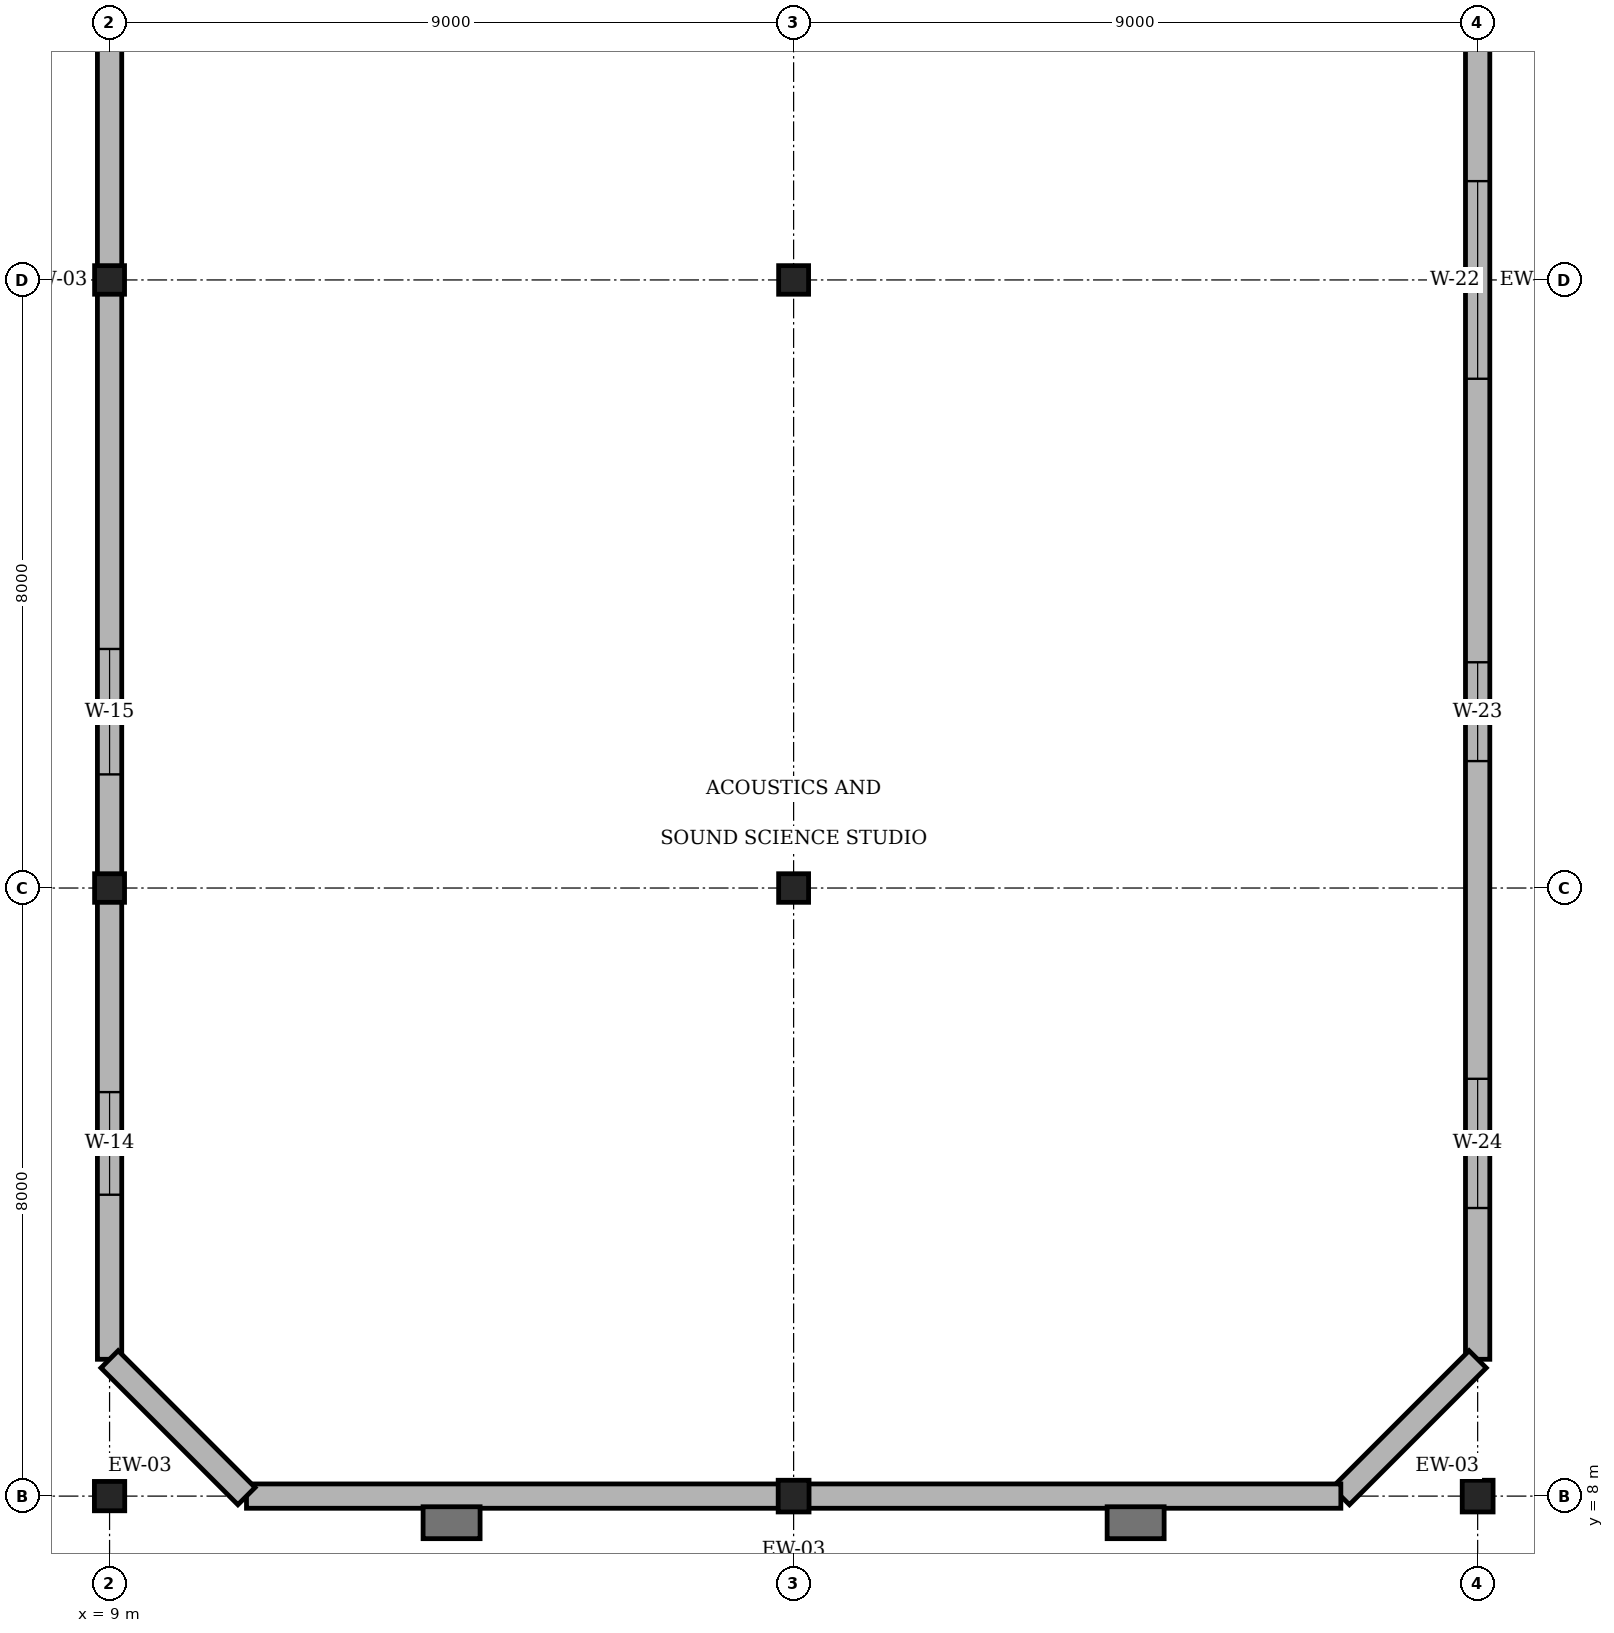
"""IFC4 building model, lengths in metres.
Left out: names, types, materials, properties, quantities, classifications, styles, units other than length and angle.
Written with IfcOpenShell. Run it as: python <this file> out.ifc"""

import sys

from ifc_helpers import new_model, si_unit, direction, frame, frame_2d, origin, origin_2d, place, context, subcontext, project, spatial, rectangle, i_section, extrude, element, fill, save


model = new_model("IFC4")
c1 = context("Model", 3, precision=1e-05, world=origin(), true_north=direction((0.0, 1.0)))
c2 = subcontext(c1, "Body", "Model", "MODEL_VIEW")
j1 = project(units=[si_unit("LENGTHUNIT", "METRE"), si_unit("PLANEANGLEUNIT", "RADIAN")], contexts=[c1])
p1 = place(None, origin())
s1 = spatial("IfcSite", under=j1, at=p1, CompositionType="ELEMENT")
p2 = place(p1, origin())
s2 = spatial("IfcBuilding", under=s1, at=p2, CompositionType="ELEMENT")
p3 = place(p2, frame((0.0, 0.0, 10.8)))
s3 = spatial("IfcBuildingStorey", under=s2, at=p3, CompositionType="ELEMENT", Elevation=10.8)
p4 = place(p3, frame((9.0, 8.0, 0.0), z_axis=(0.0, 0.0, 1.0), x_axis=(1.0, 0.0, 0.0)))
e1 = element("IfcColumn", 1, at=p4, inside=s3, PredefinedType="COLUMN", context=c2, shape_type="SweptSolid", body=[
    extrude(i_section(OverallWidth=0.399, OverallDepth=0.386, WebThickness=0.021, FlangeThickness=0.033, FilletRadius=0.015, at=origin_2d()), origin(), (0.0, 0.0, 1.0), 5.05),
])
for number, where, z_axis, x_axis in (
    (2, (18.0, 8.0, 0.0), (0.0, 0.0, 1.0), (1.0, 0.0, 0.0)),
    (3, (27.0, 8.0, 0.0), (0.0, 0.0, 1.0), (1.0, 0.0, 0.0)),
):
    element("IfcColumn", number, at=place(p3, frame(where, z_axis=z_axis, x_axis=x_axis)), inside=s3, PredefinedType="COLUMN", context=c2, shape_type="SweptSolid", body=[
        extrude(i_section(OverallWidth=0.406, OverallDepth=0.417, WebThickness=0.03, FlangeThickness=0.044, FilletRadius=0.015, at=origin_2d()), origin(), (0.0, 0.0, 1.0), 5.05),
    ])
for number, where, z_axis, x_axis in (
    (4, (9.0, 16.0, 0.0), (0.0, 0.0, 1.0), (1.0, 0.0, 0.0)),
    (5, (9.0, 24.0, 0.0), (0.0, 0.0, 1.0), (1.0, 0.0, 0.0)),
    (6, (18.0, 16.0, 0.0), (0.0, 0.0, 1.0), (1.0, 0.0, 0.0)),
    (7, (18.0, 24.0, 0.0), (0.0, 0.0, 1.0), (1.0, 0.0, 0.0)),
):
    element("IfcColumn", number, at=place(p3, frame(where, z_axis=z_axis, x_axis=x_axis)), inside=s3, PredefinedType="COLUMN", context=c2, shape_type="SweptSolid", body=[
        extrude(i_section(OverallWidth=0.394, OverallDepth=0.376, WebThickness=0.017, FlangeThickness=0.028, FilletRadius=0.015, at=origin_2d()), origin(), (0.0, 0.0, 1.0), 5.05),
    ])
for number, where, z_axis, x_axis in (
    (8, (13.5, 7.65, 0.0), (0.0, 0.0, 1.0), (1.0, 0.0, 0.0)),
    (9, (22.5, 7.65, 0.0), (0.0, 0.0, 1.0), (1.0, 0.0, 0.0)),
):
    element("IfcColumn", number, at=place(p3, frame(where, z_axis=z_axis, x_axis=x_axis)), inside=s3, PredefinedType="PILASTER", context=c2, shape_type="SweptSolid", body=[
        extrude(rectangle(XDim=0.75, YDim=0.42, at=origin_2d()), origin(), (0.0, 0.0, 1.0), 4.8),
    ])
p5 = place(p3, frame((9.0, 9.8, 0.0), z_axis=(0.0, 0.0, 1.0), x_axis=(0.0, 1.0, 0.0)))
e10 = element("IfcWall", 10, at=p5, inside=s3, PredefinedType="SOLIDWALL", context=c2, shape_type="SweptSolid", body=[
    extrude(rectangle(XDim=28.4, YDim=0.32, at=frame_2d((14.2, 0.0))), origin(), (0.0, 0.0, 1.0), 4.12),
])
p6 = place(p5, frame((2.165, 0.0, 1.0)))
e11 = element("IfcOpeningElement", 11, at=p6, cuts=e10, PredefinedType="OPENING", context=c2, shape_type="SweptSolid", body=[
    extrude(rectangle(XDim=1.35, YDim=1.6, at=frame_2d((0.675, 0.8))), frame((0.0, 0.17, 0.0), z_axis=(0.0, -1.0, 0.0), x_axis=(1.0, 0.0, 0.0)), (0.0, 0.0, 1.0), 0.34),
])
p7 = place(p5, frame((7.695, 0.0, 1.0)))
e12 = element("IfcOpeningElement", 12, at=p7, cuts=e10, PredefinedType="OPENING", context=c2, shape_type="SweptSolid", body=[
    extrude(rectangle(XDim=1.65, YDim=1.6, at=frame_2d((0.825, 0.8))), frame((0.0, 0.17, 0.0), z_axis=(0.0, -1.0, 0.0), x_axis=(1.0, 0.0, 0.0)), (0.0, 0.0, 1.0), 0.34),
])
p8 = place(p5, frame((18.905, 0.0, 1.0)))
e13 = element("IfcOpeningElement", 13, at=p8, cuts=e10, PredefinedType="OPENING", context=c2, shape_type="SweptSolid", body=[
    extrude(rectangle(XDim=1.95, YDim=1.6, at=frame_2d((0.975, 0.8))), frame((0.0, 0.17, 0.0), z_axis=(0.0, -1.0, 0.0), x_axis=(1.0, 0.0, 0.0)), (0.0, 0.0, 1.0), 0.34),
])
p9 = place(p5, frame((24.435, 0.0, 1.0)))
e14 = element("IfcOpeningElement", 14, at=p9, cuts=e10, PredefinedType="OPENING", context=c2, shape_type="SweptSolid", body=[
    extrude(rectangle(XDim=2.25, YDim=1.6, at=frame_2d((1.125, 0.8))), frame((0.0, 0.17, 0.0), z_axis=(0.0, -1.0, 0.0), x_axis=(1.0, 0.0, 0.0)), (0.0, 0.0, 1.0), 0.34),
])
p10 = place(p3, frame((27.0, 38.2, 0.0), z_axis=(0.0, 0.0, 1.0), x_axis=(0.0, -1.0, 0.0)))
e15 = element("IfcWall", 15, at=p10, inside=s3, PredefinedType="SOLIDWALL", context=c2, shape_type="SweptSolid", body=[
    extrude(rectangle(XDim=28.4, YDim=0.32, at=frame_2d((14.2, 0.0))), origin(), (0.0, 0.0, 1.0), 4.12),
])
p11 = place(p10, frame((1.965, 0.0, 1.0)))
e16 = element("IfcOpeningElement", 16, at=p11, cuts=e15, PredefinedType="OPENING", context=c2, shape_type="SweptSolid", body=[
    extrude(rectangle(XDim=1.75, YDim=2.0, at=frame_2d((0.875, 1.0))), frame((0.0, 0.17, 0.0), z_axis=(0.0, -1.0, 0.0), x_axis=(1.0, 0.0, 0.0)), (0.0, 0.0, 1.0), 0.34),
])
p12 = place(p10, frame((7.445, 0.0, 1.0)))
e17 = element("IfcOpeningElement", 17, at=p12, cuts=e15, PredefinedType="OPENING", context=c2, shape_type="SweptSolid", body=[
    extrude(rectangle(XDim=2.15, YDim=2.0, at=frame_2d((1.075, 1.0))), frame((0.0, 0.17, 0.0), z_axis=(0.0, -1.0, 0.0), x_axis=(1.0, 0.0, 0.0)), (0.0, 0.0, 1.0), 0.34),
])
p13 = place(p10, frame((12.9, 0.0, 1.0)))
e18 = element("IfcOpeningElement", 18, at=p13, cuts=e15, PredefinedType="OPENING", context=c2, shape_type="SweptSolid", body=[
    extrude(rectangle(XDim=2.6, YDim=2.0, at=frame_2d((1.3, 1.0))), frame((0.0, 0.17, 0.0), z_axis=(0.0, -1.0, 0.0), x_axis=(1.0, 0.0, 0.0)), (0.0, 0.0, 1.0), 0.34),
])
p14 = place(p10, frame((19.23, 0.0, 1.0)))
e19 = element("IfcOpeningElement", 19, at=p14, cuts=e15, PredefinedType="OPENING", context=c2, shape_type="SweptSolid", body=[
    extrude(rectangle(XDim=1.3, YDim=1.5, at=frame_2d((0.65, 0.75))), frame((0.0, 0.17, 0.0), z_axis=(0.0, -1.0, 0.0), x_axis=(1.0, 0.0, 0.0)), (0.0, 0.0, 1.0), 0.34),
])
p15 = place(p10, frame((24.71, 0.0, 1.0)))
e20 = element("IfcOpeningElement", 20, at=p15, cuts=e15, PredefinedType="OPENING", context=c2, shape_type="SweptSolid", body=[
    extrude(rectangle(XDim=1.7, YDim=1.5, at=frame_2d((0.85, 0.75))), frame((0.0, 0.17, 0.0), z_axis=(0.0, -1.0, 0.0), x_axis=(1.0, 0.0, 0.0)), (0.0, 0.0, 1.0), 0.34),
])
p16 = place(p3, frame((27.0, 9.8, 0.0), z_axis=(0.0, 0.0, 1.0), x_axis=(-0.707106781187, -0.707106781187, 0.0)))
e21 = element("IfcWall", 21, at=p16, inside=s3, PredefinedType="SOLIDWALL", context=c2, shape_type="SweptSolid", body=[
    extrude(rectangle(XDim=2.546, YDim=0.32, at=frame_2d((1.273, 0.0))), origin(), (0.0, 0.0, 1.0), 4.12),
])
p17 = place(p3, frame((25.2, 8.0, 0.0), z_axis=(0.0, 0.0, 1.0), x_axis=(-1.0, 0.0, 0.0)))
e22 = element("IfcWall", 22, at=p17, inside=s3, PredefinedType="SOLIDWALL", context=c2, shape_type="SweptSolid", body=[
    extrude(rectangle(XDim=14.398, YDim=0.32, at=frame_2d((7.199, 0.0))), origin(), (0.0, 0.0, 1.0), 4.12),
])
p18 = place(p3, frame((10.802, 8.0, 0.0), z_axis=(0.0, 0.0, 1.0), x_axis=(-0.707394320337, 0.706819125063, 0.0)))
e23 = element("IfcWall", 23, at=p18, inside=s3, PredefinedType="SOLIDWALL", context=c2, shape_type="SweptSolid", body=[
    extrude(rectangle(XDim=2.547, YDim=0.32, at=frame_2d((1.273, 0.0))), origin(), (0.0, 0.0, 1.0), 4.12),
])
p19 = place(p6, origin())
e24 = element("IfcWindow", 24, at=p19, inside=s3, PartitioningType="SINGLE_PANEL", PredefinedType="WINDOW", context=c2, shape_type="SweptSolid", body=[
    extrude(rectangle(XDim=1.35, YDim=1.6, at=frame_2d((0.675, 0.8))), frame((0.0, 0.03, 0.0), z_axis=(0.0, -1.0, 0.0), x_axis=(1.0, 0.0, 0.0)), (0.0, 0.0, 1.0), 0.06),
])
fill(e11, e24)
p20 = place(p7, origin())
e25 = element("IfcWindow", 25, at=p20, inside=s3, PartitioningType="SINGLE_PANEL", PredefinedType="WINDOW", context=c2, shape_type="SweptSolid", body=[
    extrude(rectangle(XDim=1.65, YDim=1.6, at=frame_2d((0.825, 0.8))), frame((0.0, 0.03, 0.0), z_axis=(0.0, -1.0, 0.0), x_axis=(1.0, 0.0, 0.0)), (0.0, 0.0, 1.0), 0.06),
])
fill(e12, e25)
p21 = place(p13, origin())
e26 = element("IfcWindow", 26, at=p21, inside=s3, PartitioningType="SINGLE_PANEL", PredefinedType="WINDOW", context=c2, shape_type="SweptSolid", body=[
    extrude(rectangle(XDim=2.6, YDim=2.0, at=frame_2d((1.3, 1.0))), frame((0.0, 0.03, 0.0), z_axis=(0.0, -1.0, 0.0), x_axis=(1.0, 0.0, 0.0)), (0.0, 0.0, 1.0), 0.06),
])
fill(e18, e26)
p22 = place(p14, origin())
e27 = element("IfcWindow", 27, at=p22, inside=s3, PartitioningType="SINGLE_PANEL", PredefinedType="WINDOW", context=c2, shape_type="SweptSolid", body=[
    extrude(rectangle(XDim=1.3, YDim=1.5, at=frame_2d((0.65, 0.75))), frame((0.0, 0.03, 0.0), z_axis=(0.0, -1.0, 0.0), x_axis=(1.0, 0.0, 0.0)), (0.0, 0.0, 1.0), 0.06),
])
fill(e19, e27)
p23 = place(p15, origin())
e28 = element("IfcWindow", 28, at=p23, inside=s3, PartitioningType="SINGLE_PANEL", PredefinedType="WINDOW", context=c2, shape_type="SweptSolid", body=[
    extrude(rectangle(XDim=1.7, YDim=1.5, at=frame_2d((0.85, 0.75))), frame((0.0, 0.03, 0.0), z_axis=(0.0, -1.0, 0.0), x_axis=(1.0, 0.0, 0.0)), (0.0, 0.0, 1.0), 0.06),
])
fill(e20, e28)
save(model, sys.argv[1])
